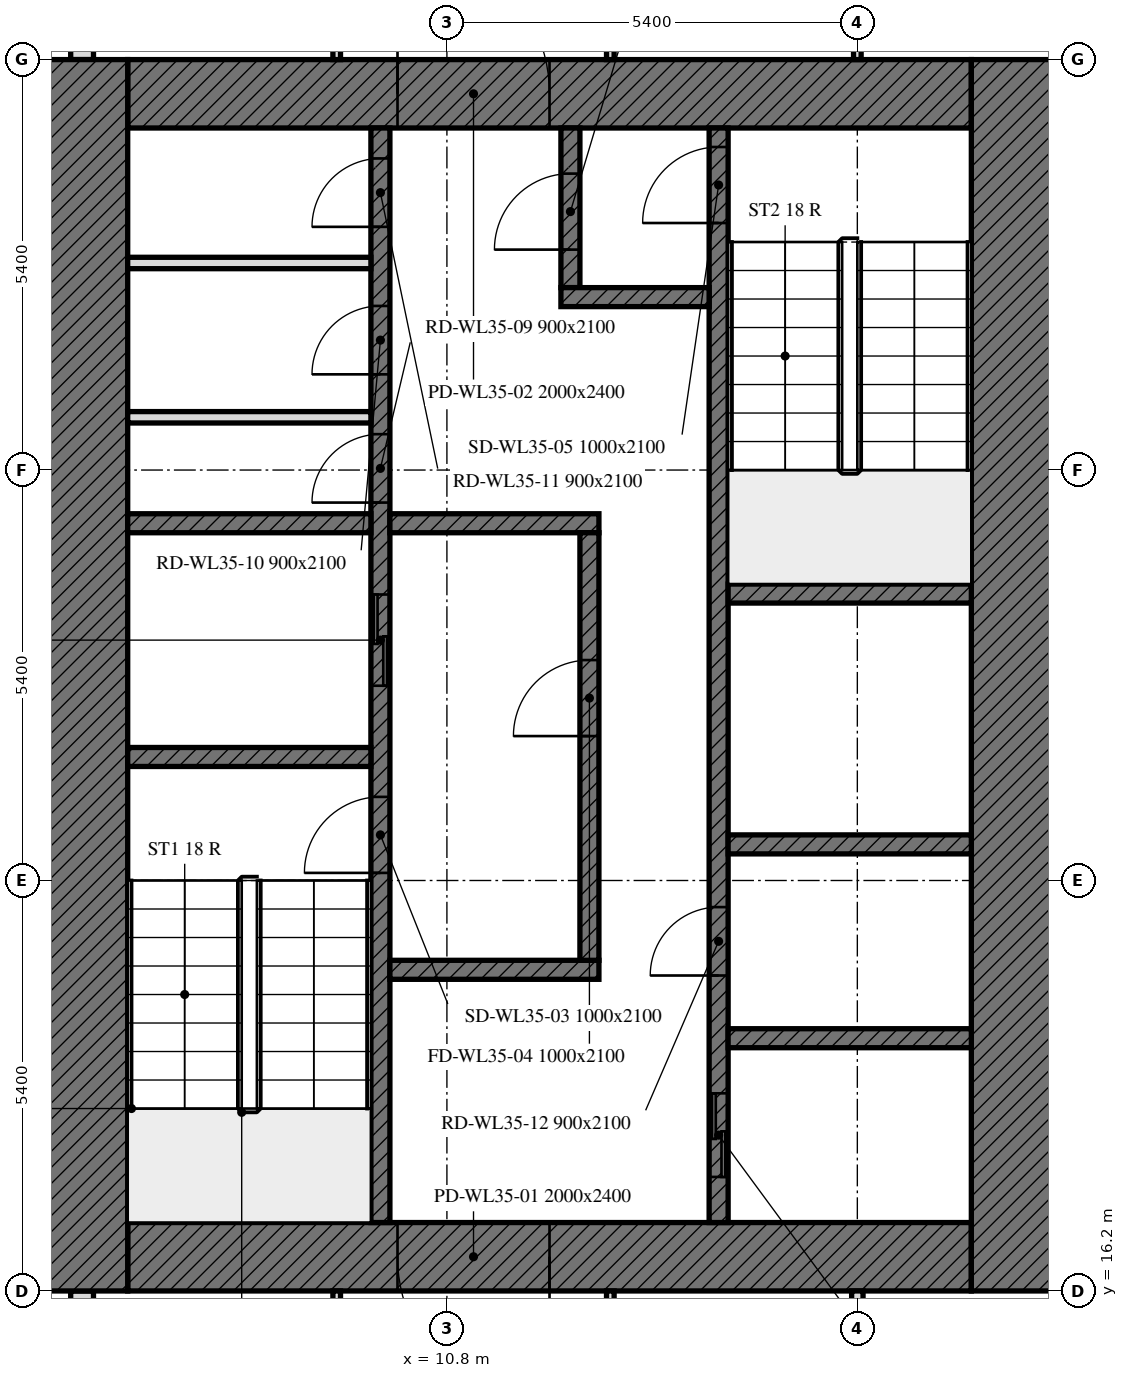
"""IFC4 building model, lengths in metres.
Left out: names, types, materials, properties, quantities, classifications, styles, units other than length and angle.
Written with IfcOpenShell. Run it as: python <this file> out.ifc"""

import sys

from ifc_helpers import new_model, si_unit, direction, frame, frame_2d, origin, place, context, subcontext, project, spatial, rectangle, extrude, element, fill, save


model = new_model("IFC4")
c1 = context("Model", 3, precision=1e-05, world=origin(), true_north=direction((0.0, 1.0)))
c2 = subcontext(c1, "Body", "Model", "MODEL_VIEW")
j1 = project(units=[si_unit("LENGTHUNIT", "METRE"), si_unit("PLANEANGLEUNIT", "RADIAN")], contexts=[c1])
p1 = place(None, origin())
s1 = spatial("IfcSite", under=j1, at=p1, CompositionType="ELEMENT")
p2 = place(p1, origin())
s2 = spatial("IfcBuilding", under=s1, at=p2, CompositionType="ELEMENT")
p3 = place(p2, frame((0.0, 0.0, 152.8)))
s3 = spatial("IfcBuildingStorey", under=s2, at=p3, CompositionType="ELEMENT", Elevation=152.8)
p4 = place(p3, frame((6.0, 37.614, 0.0), z_axis=(0.0, 0.0, 1.0), x_axis=(0.0, -1.0, 0.0)))
e1 = element("IfcWall", 1, at=p4, inside=s3, PredefinedType="SOLIDWALL", context=c2, shape_type="SweptSolid", body=[
    extrude(rectangle(XDim=5.214, YDim=0.3, at=frame_2d((2.607, 0.0))), origin(), (0.0, 0.0, 1.0), 3.0),
])
p5 = place(p4, frame((3.114, 0.0, 0.0)))
e2 = element("IfcOpeningElement", 2, at=p5, cuts=e1, PredefinedType="OPENING", context=c2, shape_type="SweptSolid", body=[
    extrude(rectangle(XDim=1.2, YDim=2.4, at=frame_2d((0.6, 1.2))), frame((0.0, 0.16, 0.0), z_axis=(0.0, -1.0, 0.0), x_axis=(1.0, 0.0, 0.0)), (0.0, 0.0, 1.0), 0.32),
])
p6 = place(p3, frame((6.0, 16.2, 0.0), z_axis=(0.0, 0.0, 1.0), x_axis=(0.0, -1.0, 0.0)))
e3 = element("IfcWall", 3, at=p6, inside=s3, PredefinedType="SOLIDWALL", context=c2, shape_type="SweptSolid", body=[
    extrude(rectangle(XDim=10.614, YDim=0.3, at=frame_2d((5.307, 0.0))), origin(), (0.0, 0.0, 1.0), 3.0),
])
p7 = place(p6, frame((1.8, 0.0, 0.0)))
e4 = element("IfcOpeningElement", 4, at=p7, cuts=e3, PredefinedType="OPENING", context=c2, shape_type="SweptSolid", body=[
    extrude(rectangle(XDim=1.8, YDim=2.4, at=frame_2d((0.9, 1.2))), frame((0.0, 0.16, 0.0), z_axis=(0.0, -1.0, 0.0), x_axis=(1.0, 0.0, 0.0)), (0.0, 0.0, 1.0), 0.32),
])
p8 = place(p6, frame((7.5, 0.0, 0.0)))
e5 = element("IfcOpeningElement", 5, at=p8, cuts=e3, PredefinedType="OPENING", context=c2, shape_type="SweptSolid", body=[
    extrude(rectangle(XDim=1.2, YDim=2.4, at=frame_2d((0.6, 1.2))), frame((0.0, 0.16, 0.0), z_axis=(0.0, -1.0, 0.0), x_axis=(1.0, 0.0, 0.0)), (0.0, 0.0, 1.0), 0.32),
])
p9 = place(p3, frame((17.7, 16.65, 0.0), z_axis=(0.0, 0.0, 1.0), x_axis=(-1.0, 0.0, 0.0)))
e6 = element("IfcWall", 6, at=p9, inside=s3, PredefinedType="SOLIDWALL", context=c2, shape_type="SweptSolid", body=[
    extrude(rectangle(XDim=11.1, YDim=0.9, at=frame_2d((5.55, 0.0))), origin(), (0.0, 0.0, 1.0), 3.0),
])
p10 = place(p9, frame((5.55, 0.0, 0.0)))
e7 = element("IfcOpeningElement", 7, at=p10, cuts=e6, PredefinedType="OPENING", context=c2, shape_type="SweptSolid", body=[
    extrude(rectangle(XDim=2.0, YDim=2.4, at=frame_2d((1.0, 1.2))), frame((0.0, 0.45, 0.0), z_axis=(0.0, -1.0, 0.0), x_axis=(1.0, 0.0, 0.0)), (0.0, 0.0, 1.0), 0.9),
])
p11 = place(p3, frame((6.6, 31.95, 0.0), z_axis=(0.0, 0.0, 1.0), x_axis=(1.0, 0.0, 0.0)))
e8 = element("IfcWall", 8, at=p11, inside=s3, PredefinedType="SOLIDWALL", context=c2, shape_type="SweptSolid", body=[
    extrude(rectangle(XDim=11.1, YDim=0.9, at=frame_2d((5.55, 0.0))), origin(), (0.0, 0.0, 1.0), 3.0),
])
p12 = place(p11, frame((3.55, 0.0, 0.0)))
e9 = element("IfcOpeningElement", 9, at=p12, cuts=e8, PredefinedType="OPENING", context=c2, shape_type="SweptSolid", body=[
    extrude(rectangle(XDim=2.0, YDim=2.4, at=frame_2d((1.0, 1.2))), frame((0.0, 0.45, 0.0), z_axis=(0.0, -1.0, 0.0), x_axis=(1.0, 0.0, 0.0)), (0.0, 0.0, 1.0), 0.9),
])
for number, where, z_axis, x_axis in (
    (10, (6.0, 16.2, 0.0), (0.0, 0.0, 1.0), (0.0, 1.0, 0.0)),
    (11, (18.3, 32.4, 0.0), (0.0, 0.0, 1.0), (0.0, -1.0, 0.0)),
):
    element("IfcWall", number, at=place(p3, frame(where, z_axis=z_axis, x_axis=x_axis)), inside=s3, PredefinedType="SOLIDWALL", context=c2, shape_type="SweptSolid", body=[
        extrude(rectangle(XDim=16.2, YDim=1.2, at=frame_2d((8.1, 0.0))), origin(), (0.0, 0.0, 1.0), 3.0),
    ])
p13 = place(p3, frame((9.925, 17.1, 0.0), z_axis=(0.0, 0.0, 1.0), x_axis=(0.0, 1.0, 0.0)))
e12 = element("IfcWall", 12, at=p13, inside=s3, PredefinedType="SOLIDWALL", context=c2, shape_type="SweptSolid", body=[
    extrude(rectangle(XDim=14.4, YDim=0.25, at=frame_2d((7.2, 0.0))), origin(), (0.0, 0.0, 1.0), 3.0),
])
p14 = place(p13, frame((4.6, 0.0, 0.0)))
e13 = element("IfcOpeningElement", 13, at=p14, cuts=e12, PredefinedType="OPENING", context=c2, shape_type="SweptSolid", body=[
    extrude(rectangle(XDim=1.0, YDim=2.1, at=frame_2d((0.5, 1.05))), frame((0.0, 0.125, 0.0), z_axis=(0.0, -1.0, 0.0), x_axis=(1.0, 0.0, 0.0)), (0.0, 0.0, 1.0), 0.25),
])
p15 = place(p13, frame((7.062, 0.0, 0.0)))
e14 = element("IfcOpeningElement", 14, at=p15, cuts=e12, PredefinedType="OPENING", context=c2, shape_type="SweptSolid", body=[
    extrude(rectangle(XDim=1.2, YDim=2.1, at=frame_2d((0.6, 1.05))), frame((0.0, 0.125, 0.0), z_axis=(0.0, -1.0, 0.0), x_axis=(1.0, 0.0, 0.0)), (0.0, 0.0, 1.0), 0.25),
])
p16 = place(p13, frame((9.472, 0.0, 0.0)))
e15 = element("IfcOpeningElement", 15, at=p16, cuts=e12, PredefinedType="OPENING", context=c2, shape_type="SweptSolid", body=[
    extrude(rectangle(XDim=0.9, YDim=2.1, at=frame_2d((0.45, 1.05))), frame((0.0, 0.125, 0.0), z_axis=(0.0, -1.0, 0.0), x_axis=(1.0, 0.0, 0.0)), (0.0, 0.0, 1.0), 0.25),
])
p17 = place(p13, frame((11.159, 0.0, 0.0)))
e16 = element("IfcOpeningElement", 16, at=p17, cuts=e12, PredefinedType="OPENING", context=c2, shape_type="SweptSolid", body=[
    extrude(rectangle(XDim=0.9, YDim=2.1, at=frame_2d((0.45, 1.05))), frame((0.0, 0.125, 0.0), z_axis=(0.0, -1.0, 0.0), x_axis=(1.0, 0.0, 0.0)), (0.0, 0.0, 1.0), 0.25),
])
p18 = place(p13, frame((13.1, 0.0, 0.0)))
e17 = element("IfcOpeningElement", 17, at=p18, cuts=e12, PredefinedType="OPENING", context=c2, shape_type="SweptSolid", body=[
    extrude(rectangle(XDim=0.9, YDim=2.1, at=frame_2d((0.45, 1.05))), frame((0.0, 0.125, 0.0), z_axis=(0.0, -1.0, 0.0), x_axis=(1.0, 0.0, 0.0)), (0.0, 0.0, 1.0), 0.25),
])
p19 = place(p3, frame((14.375, 17.1, 0.0), z_axis=(0.0, 0.0, 1.0), x_axis=(0.0, 1.0, 0.0)))
e18 = element("IfcWall", 18, at=p19, inside=s3, PredefinedType="SOLIDWALL", context=c2, shape_type="SweptSolid", body=[
    extrude(rectangle(XDim=14.4, YDim=0.25, at=frame_2d((7.2, 0.0))), origin(), (0.0, 0.0, 1.0), 3.0),
])
p20 = place(p19, frame((13.15, 0.0, 0.0)))
e19 = element("IfcOpeningElement", 19, at=p20, cuts=e18, PredefinedType="OPENING", context=c2, shape_type="SweptSolid", body=[
    extrude(rectangle(XDim=1.0, YDim=2.1, at=frame_2d((0.5, 1.05))), frame((0.0, 0.125, 0.0), z_axis=(0.0, -1.0, 0.0), x_axis=(1.0, 0.0, 0.0)), (0.0, 0.0, 1.0), 0.25),
])
p21 = place(p19, frame((0.6, 0.0, 0.0)))
e20 = element("IfcOpeningElement", 20, at=p21, cuts=e18, PredefinedType="OPENING", context=c2, shape_type="SweptSolid", body=[
    extrude(rectangle(XDim=1.1, YDim=2.1, at=frame_2d((0.55, 1.05))), frame((0.0, 0.125, 0.0), z_axis=(0.0, -1.0, 0.0), x_axis=(1.0, 0.0, 0.0)), (0.0, 0.0, 1.0), 0.25),
])
p22 = place(p19, frame((3.25, 0.0, 0.0)))
e21 = element("IfcOpeningElement", 21, at=p22, cuts=e18, PredefinedType="OPENING", context=c2, shape_type="SweptSolid", body=[
    extrude(rectangle(XDim=0.9, YDim=2.1, at=frame_2d((0.45, 1.05))), frame((0.0, 0.125, 0.0), z_axis=(0.0, -1.0, 0.0), x_axis=(1.0, 0.0, 0.0)), (0.0, 0.0, 1.0), 0.25),
])
for number, where, z_axis, x_axis in (
    (22, (6.6, 23.225, 0.0), (0.0, 0.0, 1.0), (1.0, 0.0, 0.0)),
    (23, (14.5, 25.375, 0.0), (0.0, 0.0, 1.0), (1.0, 0.0, 0.0)),
    (24, (14.5, 22.075, 0.0), (0.0, 0.0, 1.0), (1.0, 0.0, 0.0)),
    (25, (6.6, 26.3, 0.0), (0.0, 0.0, 1.0), (1.0, 0.0, 0.0)),
):
    element("IfcWall", number, at=place(p3, frame(where, z_axis=z_axis, x_axis=x_axis)), inside=s3, PredefinedType="SOLIDWALL", context=c2, shape_type="SweptSolid", body=[
        extrude(rectangle(XDim=3.2, YDim=0.25, at=frame_2d((1.6, 0.0))), origin(), (0.0, 0.0, 1.0), 3.0),
    ])
for number, where, z_axis, x_axis in (
    (26, (10.05, 26.3, 0.0), (0.0, 0.0, 1.0), (1.0, 0.0, 0.0)),
    (27, (10.05, 20.425, 0.0), (0.0, 0.0, 1.0), (1.0, 0.0, 0.0)),
):
    element("IfcWall", number, at=place(p3, frame(where, z_axis=z_axis, x_axis=x_axis)), inside=s3, PredefinedType="SOLIDWALL", context=c2, shape_type="SweptSolid", body=[
        extrude(rectangle(XDim=2.75, YDim=0.25, at=frame_2d((1.375, 0.0))), origin(), (0.0, 0.0, 1.0), 3.0),
    ])
p23 = place(p3, frame((12.425, 29.4, 0.0), z_axis=(0.0, 0.0, 1.0), x_axis=(0.0, 1.0, 0.0)))
e28 = element("IfcWall", 28, at=p23, inside=s3, PredefinedType="SOLIDWALL", context=c2, shape_type="SweptSolid", body=[
    extrude(rectangle(XDim=2.1, YDim=0.25, at=frame_2d((1.05, 0.0))), origin(), (0.0, 0.0, 1.0), 3.0),
])
p24 = place(p23, frame((0.5, 0.0, 0.0)))
e29 = element("IfcOpeningElement", 29, at=p24, cuts=e28, PredefinedType="OPENING", context=c2, shape_type="SweptSolid", body=[
    extrude(rectangle(XDim=1.0, YDim=2.1, at=frame_2d((0.5, 1.05))), frame((0.0, 0.125, 0.0), z_axis=(0.0, -1.0, 0.0), x_axis=(1.0, 0.0, 0.0)), (0.0, 0.0, 1.0), 0.25),
])
p25 = place(p3, frame((12.3, 29.275, 0.0), z_axis=(0.0, 0.0, 1.0), x_axis=(1.0, 0.0, 0.0)))
e30 = element("IfcWall", 30, at=p25, inside=s3, PredefinedType="SOLIDWALL", context=c2, shape_type="SweptSolid", body=[
    extrude(rectangle(XDim=1.95, YDim=0.25, at=frame_2d((0.975, 0.0))), origin(), (0.0, 0.0, 1.0), 3.0),
])
p26 = place(p3, frame((12.675, 20.55, 0.0), z_axis=(0.0, 0.0, 1.0), x_axis=(0.0, 1.0, 0.0)))
e31 = element("IfcWall", 31, at=p26, inside=s3, PredefinedType="SOLIDWALL", context=c2, shape_type="SweptSolid", body=[
    extrude(rectangle(XDim=5.625, YDim=0.25, at=frame_2d((2.812, 0.0))), origin(), (0.0, 0.0, 1.0), 3.0),
])
p27 = place(p26, frame((2.95, 0.0, 0.0)))
e32 = element("IfcOpeningElement", 32, at=p27, cuts=e31, PredefinedType="OPENING", context=c2, shape_type="SweptSolid", body=[
    extrude(rectangle(XDim=1.0, YDim=2.1, at=frame_2d((0.5, 1.05))), frame((0.0, 0.125, 0.0), z_axis=(0.0, -1.0, 0.0), x_axis=(1.0, 0.0, 0.0)), (0.0, 0.0, 1.0), 0.25),
])
p28 = place(p3, frame((14.5, 19.525, 0.0), z_axis=(0.0, 0.0, 1.0), x_axis=(1.0, 0.0, 0.0)))
e33 = element("IfcWall", 33, at=p28, inside=s3, PredefinedType="SOLIDWALL", context=c2, shape_type="SweptSolid", body=[
    extrude(rectangle(XDim=3.2, YDim=0.25, at=frame_2d((1.6, 0.0))), origin(), (0.0, 0.0, 1.0), 3.0),
])
for number, where, z_axis, x_axis in (
    (34, (6.6, 27.694, 0.0), (0.0, 0.0, 1.0), (1.0, 0.0, 0.0)),
    (35, (6.6, 29.724, 0.0), (0.0, 0.0, 1.0), (1.0, 0.0, 0.0)),
):
    element("IfcWall", number, at=place(p3, frame(where, z_axis=z_axis, x_axis=x_axis)), inside=s3, PredefinedType="PARTITIONING", context=c2, shape_type="SweptSolid", body=[
        extrude(rectangle(XDim=3.2, YDim=0.15, at=frame_2d((1.6, 0.0))), origin(), (0.0, 0.0, 1.0), 3.0),
    ])
for number, where, z_axis, x_axis in (
    (36, (16.2, 35.025, 0.0), (0.0, 0.0, 1.0), (0.0, -1.0, 0.0)),
    (37, (12.95, 32.4, 0.0), (0.0, 0.0, 1.0), (0.0, 1.0, 0.0)),
    (38, (9.35, 35.025, 0.0), (0.0, 0.0, 1.0), (0.0, -1.0, 0.0)),
):
    element("IfcWall", number, at=place(p3, frame(where, z_axis=z_axis, x_axis=x_axis)), inside=s3, PredefinedType="PARTITIONING", context=c2, shape_type="SweptSolid", body=[
        extrude(rectangle(XDim=2.625, YDim=0.1, at=frame_2d((1.312, 0.0))), origin(), (0.0, 0.0, 1.0), 3.0),
    ])
p29 = place(p3, frame((16.2, 16.2, 0.0), z_axis=(0.0, 0.0, 1.0), x_axis=(0.0, -1.0, 0.0)))
e39 = element("IfcWall", 39, at=p29, inside=s3, PredefinedType="PARTITIONING", context=c2, shape_type="SweptSolid", body=[
    extrude(rectangle(XDim=4.955, YDim=0.15, at=frame_2d((2.478, 0.0))), origin(), (0.0, 0.0, 1.0), 2.4),
])
for number, where, z_axis, x_axis in (
    (40, (9.35, 16.2, 0.0), (0.0, 0.0, 1.0), (0.0, -1.0, 0.0)),
    (41, (12.95, 9.075, 0.0), (0.0, 0.0, 1.0), (0.0, 1.0, 0.0)),
):
    element("IfcWall", number, at=place(p3, frame(where, z_axis=z_axis, x_axis=x_axis)), inside=s3, PredefinedType="PARTITIONING", context=c2, shape_type="SweptSolid", body=[
        extrude(rectangle(XDim=7.125, YDim=0.1, at=frame_2d((3.562, 0.0))), origin(), (0.0, 0.0, 1.0), 3.0),
    ])
p30 = place(p10, origin())
e42 = element("IfcDoor", 42, at=p30, inside=s3, OperationType="DOUBLE_DOOR_SINGLE_SWING", PredefinedType="DOOR", context=c2, shape_type="SweptSolid", body=[
    extrude(rectangle(XDim=2.0, YDim=2.4, at=frame_2d((1.0, 1.2))), frame((0.0, 0.025, 0.0), z_axis=(0.0, -1.0, 0.0), x_axis=(1.0, 0.0, 0.0)), (0.0, 0.0, 1.0), 0.05),
])
fill(e7, e42)
p31 = place(p12, origin())
e43 = element("IfcDoor", 43, at=p31, inside=s3, OperationType="DOUBLE_DOOR_SINGLE_SWING", PredefinedType="DOOR", context=c2, shape_type="SweptSolid", body=[
    extrude(rectangle(XDim=2.0, YDim=2.4, at=frame_2d((1.0, 1.2))), frame((0.0, 0.025, 0.0), z_axis=(0.0, -1.0, 0.0), x_axis=(1.0, 0.0, 0.0)), (0.0, 0.0, 1.0), 0.05),
])
fill(e9, e43)
p32 = place(p14, origin())
e44 = element("IfcDoor", 44, at=p32, inside=s3, OperationType="SINGLE_SWING_LEFT", PredefinedType="DOOR", context=c2, shape_type="SweptSolid", body=[
    extrude(rectangle(XDim=1.0, YDim=2.1, at=frame_2d((0.5, 1.05))), frame((0.0, 0.025, 0.0), z_axis=(0.0, -1.0, 0.0), x_axis=(1.0, 0.0, 0.0)), (0.0, 0.0, 1.0), 0.05),
])
fill(e13, e44)
p33 = place(p27, origin())
e45 = element("IfcDoor", 45, at=p33, inside=s3, OperationType="SINGLE_SWING_LEFT", PredefinedType="DOOR", context=c2, shape_type="SweptSolid", body=[
    extrude(rectangle(XDim=1.0, YDim=2.1, at=frame_2d((0.5, 1.05))), frame((0.0, 0.025, 0.0), z_axis=(0.0, -1.0, 0.0), x_axis=(1.0, 0.0, 0.0)), (0.0, 0.0, 1.0), 0.05),
])
fill(e32, e45)
p34 = place(p20, origin())
e46 = element("IfcDoor", 46, at=p34, inside=s3, OperationType="SINGLE_SWING_LEFT", PredefinedType="DOOR", context=c2, shape_type="SweptSolid", body=[
    extrude(rectangle(XDim=1.0, YDim=2.1, at=frame_2d((0.5, 1.05))), frame((0.0, 0.025, 0.0), z_axis=(0.0, -1.0, 0.0), x_axis=(1.0, 0.0, 0.0)), (0.0, 0.0, 1.0), 0.05),
])
fill(e19, e46)
p35 = place(p24, origin())
e47 = element("IfcDoor", 47, at=p35, inside=s3, OperationType="SINGLE_SWING_LEFT", PredefinedType="DOOR", context=c2, shape_type="SweptSolid", body=[
    extrude(rectangle(XDim=1.0, YDim=2.1, at=frame_2d((0.5, 1.05))), frame((0.0, 0.025, 0.0), z_axis=(0.0, -1.0, 0.0), x_axis=(1.0, 0.0, 0.0)), (0.0, 0.0, 1.0), 0.05),
])
fill(e29, e47)
p36 = place(p15, origin())
e48 = element("IfcDoor", 48, at=p36, inside=s3, OperationType="DOUBLE_DOOR_SLIDING", PredefinedType="DOOR", context=c2, shape_type="SweptSolid", body=[
    extrude(rectangle(XDim=1.2, YDim=2.1, at=frame_2d((0.6, 1.05))), frame((0.0, 0.025, 0.0), z_axis=(0.0, -1.0, 0.0), x_axis=(1.0, 0.0, 0.0)), (0.0, 0.0, 1.0), 0.05),
])
fill(e14, e48)
p37 = place(p21, origin())
e49 = element("IfcDoor", 49, at=p37, inside=s3, OperationType="DOUBLE_DOOR_SLIDING", PredefinedType="DOOR", context=c2, shape_type="SweptSolid", body=[
    extrude(rectangle(XDim=1.1, YDim=2.1, at=frame_2d((0.55, 1.05))), frame((0.0, 0.025, 0.0), z_axis=(0.0, -1.0, 0.0), x_axis=(1.0, 0.0, 0.0)), (0.0, 0.0, 1.0), 0.05),
])
fill(e20, e49)
p38 = place(p16, origin())
e50 = element("IfcDoor", 50, at=p38, inside=s3, OperationType="SINGLE_SWING_LEFT", PredefinedType="DOOR", context=c2, shape_type="SweptSolid", body=[
    extrude(rectangle(XDim=0.9, YDim=2.1, at=frame_2d((0.45, 1.05))), frame((0.0, 0.025, 0.0), z_axis=(0.0, -1.0, 0.0), x_axis=(1.0, 0.0, 0.0)), (0.0, 0.0, 1.0), 0.05),
])
fill(e15, e50)
p39 = place(p17, origin())
e51 = element("IfcDoor", 51, at=p39, inside=s3, OperationType="SINGLE_SWING_LEFT", PredefinedType="DOOR", context=c2, shape_type="SweptSolid", body=[
    extrude(rectangle(XDim=0.9, YDim=2.1, at=frame_2d((0.45, 1.05))), frame((0.0, 0.025, 0.0), z_axis=(0.0, -1.0, 0.0), x_axis=(1.0, 0.0, 0.0)), (0.0, 0.0, 1.0), 0.05),
])
fill(e16, e51)
p40 = place(p18, origin())
e52 = element("IfcDoor", 52, at=p40, inside=s3, OperationType="SINGLE_SWING_LEFT", PredefinedType="DOOR", context=c2, shape_type="SweptSolid", body=[
    extrude(rectangle(XDim=0.9, YDim=2.1, at=frame_2d((0.45, 1.05))), frame((0.0, 0.025, 0.0), z_axis=(0.0, -1.0, 0.0), x_axis=(1.0, 0.0, 0.0)), (0.0, 0.0, 1.0), 0.05),
])
fill(e17, e52)
p41 = place(p22, origin())
e53 = element("IfcDoor", 53, at=p41, inside=s3, OperationType="SINGLE_SWING_LEFT", PredefinedType="DOOR", context=c2, shape_type="SweptSolid", body=[
    extrude(rectangle(XDim=0.9, YDim=2.1, at=frame_2d((0.45, 1.05))), frame((0.0, 0.025, 0.0), z_axis=(0.0, -1.0, 0.0), x_axis=(1.0, 0.0, 0.0)), (0.0, 0.0, 1.0), 0.05),
])
fill(e21, e53)
save(model, sys.argv[1])
